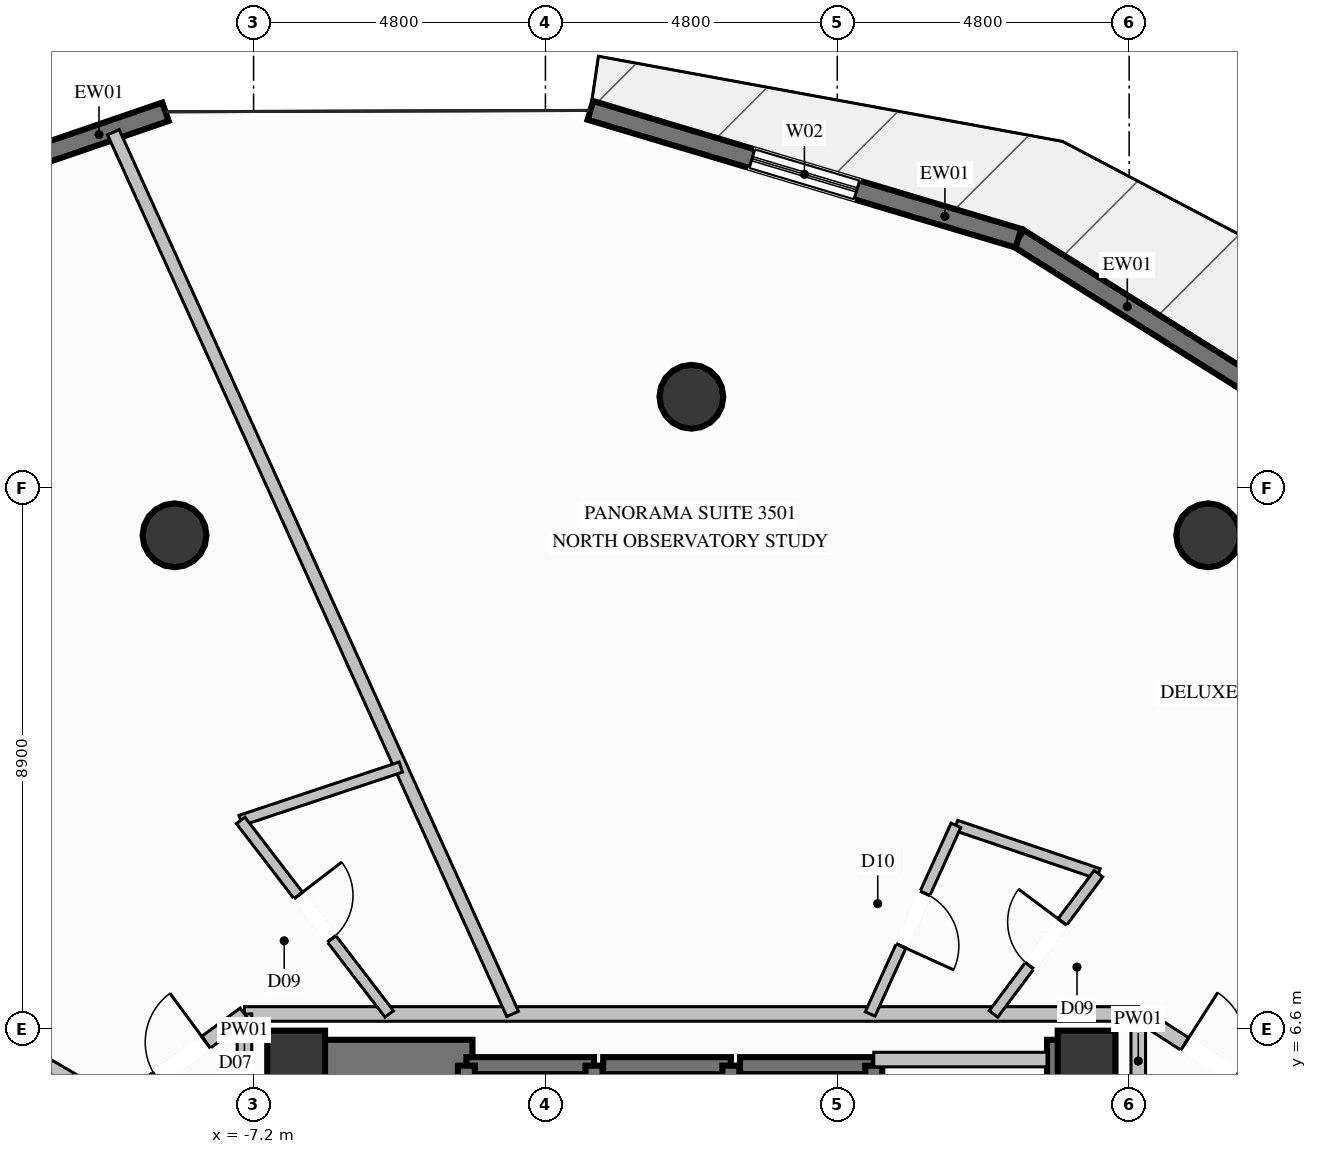
"""IFC4 building model, lengths in metres.
Left out: names, types, materials, properties, quantities, classifications, styles, units other than length and angle.
Written with IfcOpenShell. Run it as: python <this file> out.ifc"""

import sys

from ifc_helpers import new_model, si_unit, direction, frame, frame_2d, origin, origin_2d, place, context, subcontext, project, spatial, rectangle, circle, extrude, element, fill, save


model = new_model("IFC4")
c1 = context("Model", 3, precision=1e-05, world=origin(), true_north=direction((0.0, 1.0)))
c2 = subcontext(c1, "Body", "Model", "MODEL_VIEW")
j1 = project(units=[si_unit("LENGTHUNIT", "METRE"), si_unit("PLANEANGLEUNIT", "RADIAN")], contexts=[c1])
p1 = place(None, origin())
s1 = spatial("IfcSite", under=j1, at=p1, CompositionType="ELEMENT")
p2 = place(p1, origin())
s2 = spatial("IfcBuilding", under=s1, at=p2, CompositionType="ELEMENT")
p3 = place(p2, frame((0.0, 0.0, 131.4)))
s3 = spatial("IfcBuildingStorey", under=s2, at=p3, CompositionType="ELEMENT", Elevation=131.4)
for number, where, z_axis, x_axis in (
    (1, (6.5, 6.1, 0.0), (0.0, 0.0, 1.0), (1.0, 0.0, 0.0)),
    (2, (-6.5, 6.1, 0.0), (0.0, 0.0, 1.0), (1.0, 0.0, 0.0)),
):
    element("IfcColumn", number, at=place(p3, frame(where, z_axis=z_axis, x_axis=x_axis)), inside=s3, PredefinedType="COLUMN", context=c2, shape_type="SweptSolid", body=[
        extrude(rectangle(XDim=0.95, YDim=0.95, at=origin_2d()), origin(), (0.0, 0.0, 1.0), 3.6),
    ])
p4 = place(p3, frame((-6.175, 6.1, 0.0), z_axis=(0.0, 0.0, 1.0), x_axis=(1.0, 0.0, 0.0)))
e3 = element("IfcWall", 3, at=p4, inside=s3, PredefinedType="SHEAR", context=c2, shape_type="SweptSolid", body=[
    extrude(rectangle(XDim=2.575, YDim=0.65, at=frame_2d((1.288, 0.0))), origin(), (0.0, 0.0, 1.0), 3.6),
])
p5 = place(p3, frame((5.85, 6.1, 0.0), z_axis=(0.0, 0.0, 1.0), x_axis=(1.0, 0.0, 0.0)))
e4 = element("IfcWall", 4, at=p5, inside=s3, PredefinedType="SHEAR", context=c2, shape_type="SweptSolid", body=[
    extrude(rectangle(XDim=0.325, YDim=0.65, at=frame_2d((0.163, 0.0))), origin(), (0.0, 0.0, 1.0), 3.6),
])
p6 = place(p3, frame((-6.5, 2.35, 0.0), z_axis=(0.0, 0.0, 1.0), x_axis=(0.0, 1.0, 0.0)))
e5 = element("IfcWall", 5, at=p6, inside=s3, PredefinedType="SHEAR", context=c2, shape_type="SweptSolid", body=[
    extrude(rectangle(XDim=4.075, YDim=0.65, at=frame_2d((2.038, 0.0))), origin(), (0.0, 0.0, 1.0), 3.6),
])
p7 = place(p3, frame((6.5, 3.35, 0.0), z_axis=(0.0, 0.0, 1.0), x_axis=(0.0, 1.0, 0.0)))
e6 = element("IfcWall", 6, at=p7, inside=s3, PredefinedType="SHEAR", context=c2, shape_type="SweptSolid", body=[
    extrude(rectangle(XDim=3.075, YDim=0.65, at=frame_2d((1.538, 0.0))), origin(), (0.0, 0.0, 1.0), 3.6),
])
for number, where, z_axis, x_axis in (
    (7, (8.5, 14.722, 0.0), (0.0, 0.0, 1.0), (1.0, 0.0, 0.0)),
    (8, (0.0, 17.0, 0.0), (0.0, 0.0, 1.0), (1.0, 0.0, 0.0)),
    (9, (-8.5, 14.722, 0.0), (0.0, 0.0, 1.0), (1.0, 0.0, 0.0)),
):
    element("IfcColumn", number, at=place(p3, frame(where, z_axis=z_axis, x_axis=x_axis)), inside=s3, PredefinedType="COLUMN", context=c2, shape_type="SweptSolid", body=[
        extrude(circle(Radius=0.525, at=origin_2d()), origin(), (0.0, 0.0, 1.0), 3.6),
    ])
p8 = place(p3, frame((5.379, 19.607, 0.0), z_axis=(0.0, 0.0, 1.0), x_axis=(0.84673132195, -0.5320207406, 0.0)))
e10 = element("IfcWall", 10, at=p8, inside=s3, PredefinedType="SOLIDWALL", context=c2, shape_type="SweptSolid", body=[
    extrude(rectangle(XDim=7.56, YDim=0.32, at=frame_2d((3.78, 0.0))), origin(), (0.0, 0.0, 1.0), 3.35),
])
p9 = place(p8, frame((4.479, 0.0, 0.35)))
e11 = element("IfcOpeningElement", 11, at=p9, cuts=e10, PredefinedType="OPENING", context=c2, shape_type="SweptSolid", body=[
    extrude(rectangle(XDim=1.8, YDim=2.6, at=frame_2d((0.9, 1.3))), frame((0.0, 0.17, 0.0), z_axis=(0.0, -1.0, 0.0), x_axis=(1.0, 0.0, 0.0)), (0.0, 0.0, 1.0), 0.34),
])
p10 = place(p3, frame((-1.66, 21.709, 0.0), z_axis=(0.0, 0.0, 1.0), x_axis=(0.958185017538, -0.286149387847, 0.0)))
e12 = element("IfcWall", 12, at=p10, inside=s3, PredefinedType="SOLIDWALL", context=c2, shape_type="SweptSolid", body=[
    extrude(rectangle(XDim=7.346, YDim=0.32, at=frame_2d((3.673, 0.0))), origin(), (0.0, 0.0, 1.0), 3.35),
])
p11 = place(p10, frame((2.773, 0.0, 0.35)))
e13 = element("IfcOpeningElement", 13, at=p11, cuts=e12, PredefinedType="OPENING", context=c2, shape_type="SweptSolid", body=[
    extrude(rectangle(XDim=1.8, YDim=2.6, at=frame_2d((0.9, 1.3))), frame((0.0, 0.17, 0.0), z_axis=(0.0, -1.0, 0.0), x_axis=(1.0, 0.0, 0.0)), (0.0, 0.0, 1.0), 0.34),
])
p12 = place(p3, frame((-14.904, 19.542, 0.0), z_axis=(0.0, 0.0, 1.0), x_axis=(0.945927174226, 0.324379070011, 0.0)))
e14 = element("IfcWall", 14, at=p12, inside=s3, PredefinedType="SOLIDWALL", context=c2, shape_type="SweptSolid", body=[
    extrude(rectangle(XDim=6.613, YDim=0.32, at=frame_2d((3.306, 0.0))), origin(), (0.0, 0.0, 1.0), 3.35),
])
p13 = place(p12, frame((2.251, 0.0, 0.35)))
e15 = element("IfcOpeningElement", 15, at=p13, cuts=e14, PredefinedType="OPENING", context=c2, shape_type="SweptSolid", body=[
    extrude(rectangle(XDim=1.8, YDim=2.6, at=frame_2d((0.9, 1.3))), frame((0.0, 0.17, 0.0), z_axis=(0.0, -1.0, 0.0), x_axis=(1.0, 0.0, 0.0)), (0.0, 0.0, 1.0), 0.34),
])
p14 = place(p3, frame((-1.6, 6.0, 0.0), z_axis=(0.0, 0.0, 1.0), x_axis=(-1.0, 0.0, 0.0)))
e16 = element("IfcWall", 16, at=p14, inside=s3, PredefinedType="SOLIDWALL", context=c2, shape_type="SweptSolid", body=[
    extrude(rectangle(XDim=2.1, YDim=0.28, at=frame_2d((1.05, 0.0))), origin(), (0.0, 0.0, 1.0), 3.35),
])
for number, where, z_axis, x_axis in (
    (17, (-3.7, 6.0, 0.0), (0.0, 0.0, 1.0), (0.0, -1.0, 0.0)),
    (18, (-1.6, 3.5, 0.0), (0.0, 0.0, 1.0), (0.0, 1.0, 0.0)),
):
    element("IfcWall", number, at=place(p3, frame(where, z_axis=z_axis, x_axis=x_axis)), inside=s3, PredefinedType="SOLIDWALL", context=c2, shape_type="SweptSolid", body=[
        extrude(rectangle(XDim=2.5, YDim=0.28, at=frame_2d((1.25, 0.0))), origin(), (0.0, 0.0, 1.0), 3.35),
    ])
p15 = place(p3, frame((0.65, 6.0, 0.0), z_axis=(0.0, 0.0, 1.0), x_axis=(-1.0, 0.0, 0.0)))
e19 = element("IfcWall", 19, at=p15, inside=s3, PredefinedType="SOLIDWALL", context=c2, shape_type="SweptSolid", body=[
    extrude(rectangle(XDim=2.1, YDim=0.28, at=frame_2d((1.05, 0.0))), origin(), (0.0, 0.0, 1.0), 3.35),
])
p16 = place(p3, frame((0.65, 3.5, 0.0), z_axis=(0.0, 0.0, 1.0), x_axis=(0.0, 1.0, 0.0)))
e20 = element("IfcWall", 20, at=p16, inside=s3, PredefinedType="SOLIDWALL", context=c2, shape_type="SweptSolid", body=[
    extrude(rectangle(XDim=2.5, YDim=0.28, at=frame_2d((1.25, 0.0))), origin(), (0.0, 0.0, 1.0), 3.35),
])
p17 = place(p3, frame((3.0, 6.0, 0.0), z_axis=(0.0, 0.0, 1.0), x_axis=(-1.0, 0.0, 0.0)))
e21 = element("IfcWall", 21, at=p17, inside=s3, PredefinedType="SOLIDWALL", context=c2, shape_type="SweptSolid", body=[
    extrude(rectangle(XDim=2.2, YDim=0.28, at=frame_2d((1.1, 0.0))), origin(), (0.0, 0.0, 1.0), 3.35),
])
p18 = place(p3, frame((3.0, 3.5, 0.0), z_axis=(0.0, 0.0, 1.0), x_axis=(0.0, 1.0, 0.0)))
e22 = element("IfcWall", 22, at=p18, inside=s3, PredefinedType="SOLIDWALL", context=c2, shape_type="SweptSolid", body=[
    extrude(rectangle(XDim=2.5, YDim=0.28, at=frame_2d((1.25, 0.0))), origin(), (0.0, 0.0, 1.0), 3.35),
])
p19 = place(p3, frame((-7.35, 6.85, 0.0), z_axis=(0.0, 0.0, 1.0), x_axis=(1.0, 0.0, 0.0)))
e23 = element("IfcWall", 23, at=p19, inside=s3, PredefinedType="PARTITIONING", context=c2, shape_type="SweptSolid", body=[
    extrude(rectangle(XDim=14.7, YDim=0.24, at=frame_2d((7.35, 0.0))), origin(), (0.0, 0.0, 1.0), 2.435),
])
p20 = place(p3, frame((-7.35, 4.95, 0.0), z_axis=(0.0, 0.0, 1.0), x_axis=(0.0, 1.0, 0.0)))
e24 = element("IfcWall", 24, at=p20, inside=s3, PredefinedType="PARTITIONING", context=c2, shape_type="SweptSolid", body=[
    extrude(rectangle(XDim=1.9, YDim=0.24, at=frame_2d((0.95, 0.0))), origin(), (0.0, 0.0, 1.0), 2.435),
])
p21 = place(p3, frame((7.35, 5.3, 0.0), z_axis=(0.0, 0.0, 1.0), x_axis=(0.0, 1.0, 0.0)))
e25 = element("IfcWall", 25, at=p21, inside=s3, PredefinedType="PARTITIONING", context=c2, shape_type="SweptSolid", body=[
    extrude(rectangle(XDim=1.55, YDim=0.24, at=frame_2d((0.775, 0.0))), origin(), (0.0, 0.0, 1.0), 2.435),
])
p22 = place(p3, frame((3.0, 6.1, 0.0), z_axis=(0.0, 0.0, 1.0), x_axis=(1.0, 0.0, 0.0)))
e26 = element("IfcWall", 26, at=p22, inside=s3, PredefinedType="PARTITIONING", context=c2, shape_type="SweptSolid", body=[
    extrude(rectangle(XDim=2.85, YDim=0.24, at=frame_2d((1.425, 0.0))), origin(), (0.0, 0.0, 1.0), 2.435),
])
p23 = place(p3, frame((-9.42, 5.325, 0.0), z_axis=(0.0, 0.0, 1.0), x_axis=(-0.862477017481, 0.506096230293, 0.0)))
e27 = element("IfcWall", 27, at=p23, inside=s3, PredefinedType="PARTITIONING", context=c2, shape_type="SweptSolid", body=[
    extrude(rectangle(XDim=5.637, YDim=0.21, at=frame_2d((2.819, 0.0))), origin(), (0.0, 0.0, 1.0), 2.791),
])
p24 = place(p3, frame((4.351, 9.951, 0.0), z_axis=(0.0, 0.0, 1.0), x_axis=(0.947023172819, -0.321165238069, 0.0)))
e28 = element("IfcWall", 28, at=p24, inside=s3, PredefinedType="PLUMBINGWALL", context=c2, shape_type="SweptSolid", body=[
    extrude(rectangle(XDim=2.475, YDim=0.175, at=frame_2d((1.238, 0.0))), origin(), (0.0, 0.0, 1.0), 3.35),
])
p25 = place(p3, frame((4.351, 9.951, 0.0), z_axis=(0.0, 0.0, 1.0), x_axis=(-0.414207844199, -0.910182323386, 0.0)))
e29 = element("IfcWall", 29, at=p25, inside=s3, PredefinedType="PLUMBINGWALL", context=c2, shape_type="SweptSolid", body=[
    extrude(rectangle(XDim=3.407, YDim=0.175, at=frame_2d((1.703, 0.0))), origin(), (0.0, 0.0, 1.0), 3.35),
])
p26 = place(p25, frame((1.228, 0.0, 0.0)))
e30 = element("IfcOpeningElement", 30, at=p26, cuts=e29, PredefinedType="OPENING", context=c2, shape_type="SweptSolid", body=[
    extrude(rectangle(XDim=0.95, YDim=2.1, at=frame_2d((0.475, 1.05))), frame((0.0, 0.098, 0.0), z_axis=(0.0, -1.0, 0.0), x_axis=(1.0, 0.0, 0.0)), (0.0, 0.0, 1.0), 0.195),
])
p27 = place(p3, frame((4.969, 6.85, 0.0), z_axis=(0.0, 0.0, 1.0), x_axis=(0.599253850401, 0.800559068888, 0.0)))
e31 = element("IfcWall", 31, at=p27, inside=s3, PredefinedType="PLUMBINGWALL", context=c2, shape_type="SweptSolid", body=[
    extrude(rectangle(XDim=2.88, YDim=0.175, at=frame_2d((1.44, 0.0))), origin(), (0.0, 0.0, 1.0), 2.791),
])
p28 = place(p27, frame((0.99, 0.0, 0.0)))
e32 = element("IfcOpeningElement", 32, at=p28, cuts=e31, PredefinedType="OPENING", context=c2, shape_type="SweptSolid", body=[
    extrude(rectangle(XDim=0.9, YDim=2.1, at=frame_2d((0.45, 1.05))), frame((0.0, 0.098, 0.0), z_axis=(0.0, -1.0, 0.0), x_axis=(1.0, 0.0, 0.0)), (0.0, 0.0, 1.0), 0.195),
])
p29 = place(p3, frame((7.35, 6.85, 0.0), z_axis=(0.0, 0.0, 1.0), x_axis=(0.840910978735, -0.541173471119, 0.0)))
e33 = element("IfcWall", 33, at=p29, inside=s3, PredefinedType="PARTITIONING", context=c2, shape_type="SweptSolid", body=[
    extrude(rectangle(XDim=2.818, YDim=0.24, at=frame_2d((1.409, 0.0))), origin(), (0.0, 0.0, 1.0), 3.35),
])
p30 = place(p29, frame((0.909, 0.0, 0.0)))
e34 = element("IfcOpeningElement", 34, at=p30, cuts=e33, PredefinedType="OPENING", context=c2, shape_type="SweptSolid", body=[
    extrude(rectangle(XDim=1.0, YDim=2.2, at=frame_2d((0.5, 1.1))), frame((0.0, 0.13, 0.0), z_axis=(0.0, -1.0, 0.0), x_axis=(1.0, 0.0, 0.0)), (0.0, 0.0, 1.0), 0.26),
])
p31 = place(p3, frame((-2.94, 6.85, 0.0), z_axis=(0.0, 0.0, 1.0), x_axis=(-0.412490983748, 0.910961683238, 0.0)))
e35 = element("IfcWall", 35, at=p31, inside=s3, PredefinedType="PARTITIONING", context=c2, shape_type="SweptSolid", body=[
    extrude(rectangle(XDim=15.918, YDim=0.21, at=frame_2d((7.959, 0.0))), origin(), (0.0, 0.0, 1.0), 3.35),
])
p32 = place(p3, frame((-7.412, 10.033, 0.0), z_axis=(0.0, 0.0, 1.0), x_axis=(0.948797559609, 0.315884774689, 0.0)))
e36 = element("IfcWall", 36, at=p32, inside=s3, PredefinedType="PLUMBINGWALL", context=c2, shape_type="SweptSolid", body=[
    extrude(rectangle(XDim=2.776, YDim=0.175, at=frame_2d((1.388, 0.0))), origin(), (0.0, 0.0, 1.0), 2.985),
])
p33 = place(p3, frame((-7.412, 10.033, 0.0), z_axis=(0.0, 0.0, 1.0), x_axis=(0.608890025588, -0.793254648105, 0.0)))
e37 = element("IfcWall", 37, at=p33, inside=s3, PredefinedType="PLUMBINGWALL", context=c2, shape_type="SweptSolid", body=[
    extrude(rectangle(XDim=4.012, YDim=0.175, at=frame_2d((2.006, 0.0))), origin(), (0.0, 0.0, 1.0), 2.791),
])
p34 = place(p33, frame((1.556, 0.0, 0.0)))
e38 = element("IfcOpeningElement", 38, at=p34, cuts=e37, PredefinedType="OPENING", context=c2, shape_type="SweptSolid", body=[
    extrude(rectangle(XDim=0.9, YDim=2.1, at=frame_2d((0.45, 1.05))), frame((0.0, 0.098, 0.0), z_axis=(0.0, -1.0, 0.0), x_axis=(1.0, 0.0, 0.0)), (0.0, 0.0, 1.0), 0.195),
])
p35 = place(p3, frame((-9.42, 5.325, 0.0), z_axis=(0.0, 0.0, 1.0), x_axis=(0.805053450612, 0.593202277185, 0.0)))
e39 = element("IfcWall", 39, at=p35, inside=s3, PredefinedType="PARTITIONING", context=c2, shape_type="SweptSolid", body=[
    extrude(rectangle(XDim=2.571, YDim=0.24, at=frame_2d((1.286, 0.0))), origin(), (0.0, 0.0, 1.0), 3.35),
])
p36 = place(p35, frame((0.786, 0.0, 0.0)))
e40 = element("IfcOpeningElement", 40, at=p36, cuts=e39, PredefinedType="OPENING", context=c2, shape_type="SweptSolid", body=[
    extrude(rectangle(XDim=1.0, YDim=2.2, at=frame_2d((0.5, 1.1))), frame((0.0, 0.13, 0.0), z_axis=(0.0, -1.0, 0.0), x_axis=(1.0, 0.0, 0.0)), (0.0, 0.0, 1.0), 0.26),
])
p37 = place(p11, origin())
e41 = element("IfcWindow", 41, at=p37, inside=s3, PartitioningType="SINGLE_PANEL", PredefinedType="WINDOW", context=c2, shape_type="SweptSolid", body=[
    extrude(rectangle(XDim=1.8, YDim=2.6, at=frame_2d((0.9, 1.3))), frame((0.0, 0.03, 0.0), z_axis=(0.0, -1.0, 0.0), x_axis=(1.0, 0.0, 0.0)), (0.0, 0.0, 1.0), 0.06),
])
fill(e13, e41)
p38 = place(p28, origin())
e42 = element("IfcDoor", 42, at=p38, inside=s3, OperationType="SINGLE_SWING_RIGHT", PredefinedType="DOOR", context=c2, shape_type="SweptSolid", body=[
    extrude(rectangle(XDim=0.9, YDim=2.1, at=frame_2d((0.45, 1.05))), frame((0.0, 0.025, 0.0), z_axis=(0.0, -1.0, 0.0), x_axis=(1.0, 0.0, 0.0)), (0.0, 0.0, 1.0), 0.05),
])
fill(e32, e42)
p39 = place(p30, origin())
e43 = element("IfcDoor", 43, at=p39, inside=s3, OperationType="SINGLE_SWING_LEFT", PredefinedType="DOOR", context=c2, shape_type="SweptSolid", body=[
    extrude(rectangle(XDim=1.0, YDim=2.2, at=frame_2d((0.5, 1.1))), frame((0.0, 0.025, 0.0), z_axis=(0.0, -1.0, 0.0), x_axis=(1.0, 0.0, 0.0)), (0.0, 0.0, 1.0), 0.05),
])
fill(e34, e43)
p40 = place(p26, origin())
e44 = element("IfcDoor", 44, at=p40, inside=s3, OperationType="SINGLE_SWING_RIGHT", PredefinedType="DOOR", context=c2, shape_type="SweptSolid", body=[
    extrude(rectangle(XDim=0.95, YDim=2.1, at=frame_2d((0.475, 1.05))), frame((0.0, 0.025, 0.0), z_axis=(0.0, -1.0, 0.0), x_axis=(1.0, 0.0, 0.0)), (0.0, 0.0, 1.0), 0.05),
])
fill(e30, e44)
p41 = place(p34, origin())
e45 = element("IfcDoor", 45, at=p41, inside=s3, OperationType="SINGLE_SWING_LEFT", PredefinedType="DOOR", context=c2, shape_type="SweptSolid", body=[
    extrude(rectangle(XDim=0.9, YDim=2.1, at=frame_2d((0.45, 1.05))), frame((0.0, 0.025, 0.0), z_axis=(0.0, -1.0, 0.0), x_axis=(1.0, 0.0, 0.0)), (0.0, 0.0, 1.0), 0.05),
])
fill(e38, e45)
p42 = place(p36, origin())
e46 = element("IfcDoor", 46, at=p42, inside=s3, OperationType="SINGLE_SWING_RIGHT", PredefinedType="DOOR", context=c2, shape_type="SweptSolid", body=[
    extrude(rectangle(XDim=1.0, YDim=2.2, at=frame_2d((0.5, 1.1))), frame((0.0, 0.025, 0.0), z_axis=(0.0, -1.0, 0.0), x_axis=(1.0, 0.0, 0.0)), (0.0, 0.0, 1.0), 0.05),
])
fill(e40, e46)
save(model, sys.argv[1])
